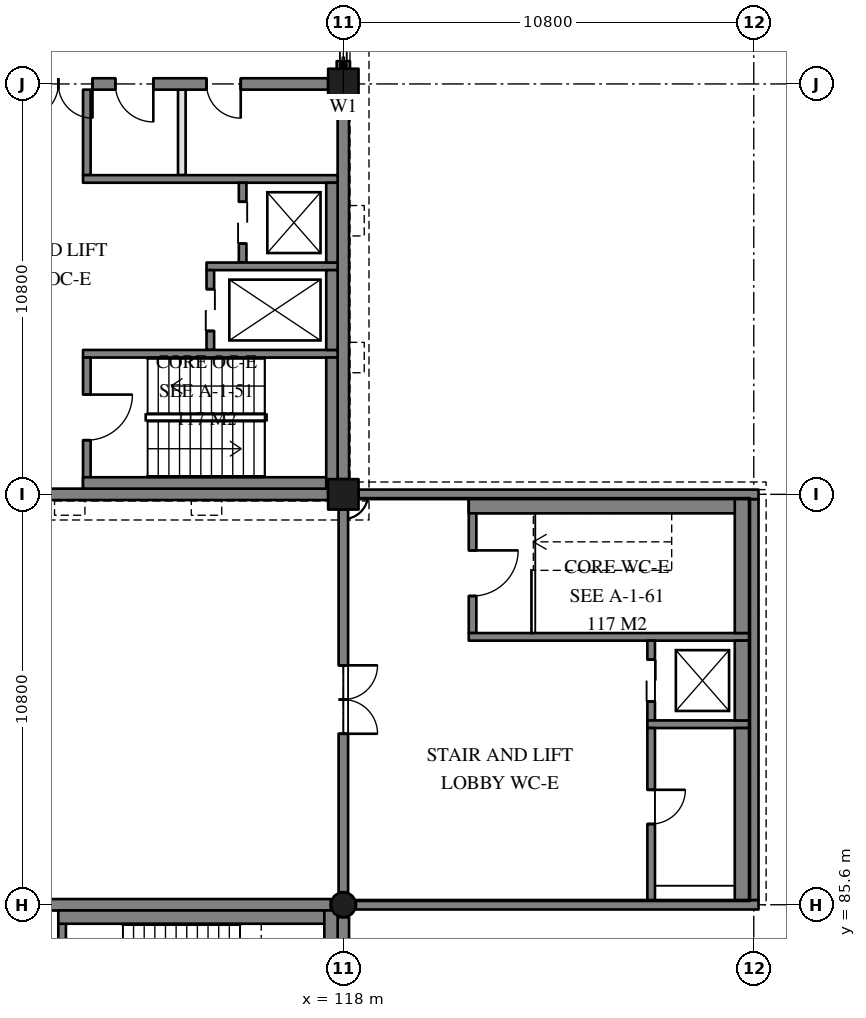
"""IFC4 building model, lengths in metres.
Left out: names, types, materials, properties, quantities, classifications, styles, units other than length and angle.
Written with IfcOpenShell. Run it as: python <this file> out.ifc"""

import sys

from ifc_helpers import new_model, si_unit, direction, frame, frame_2d, origin, origin_2d, place, context, subcontext, project, spatial, rectangle, hollow_circle, extrude, element, fill, save


model = new_model("IFC4")
c1 = context("Model", 3, precision=1e-05, world=origin(), true_north=direction((0.0, 1.0)))
c2 = subcontext(c1, "Body", "Model", "MODEL_VIEW")
j1 = project(units=[si_unit("LENGTHUNIT", "METRE"), si_unit("PLANEANGLEUNIT", "RADIAN")], contexts=[c1])
p1 = place(None, origin())
s1 = spatial("IfcSite", under=j1, at=p1, CompositionType="ELEMENT")
p2 = place(p1, origin())
s2 = spatial("IfcBuilding", under=s1, at=p2, CompositionType="ELEMENT")
p3 = place(p2, frame((0.0, 0.0, 4.8)))
s3 = spatial("IfcBuildingStorey", under=s2, at=p3, CompositionType="ELEMENT", Elevation=4.8)
p4 = place(p3, frame((118.0, 85.6, 0.0), z_axis=(0.0, 0.0, 1.0), x_axis=(1.0, 0.0, 0.0)))
e1 = element("IfcColumn", 1, at=p4, inside=s3, PredefinedType="COLUMN", context=c2, shape_type="SweptSolid", body=[
    extrude(hollow_circle(Radius=0.33, WallThickness=0.025, at=origin_2d()), origin(), (0.0, 0.0, 1.0), 3.9),
])
p5 = place(p3, frame((118.0, 96.4, 0.0), z_axis=(0.0, 0.0, 1.0), x_axis=(1.0, 0.0, 0.0)))
e2 = element("IfcColumn", 2, at=p5, inside=s3, PredefinedType="COLUMN", context=c2, shape_type="SweptSolid", body=[
    extrude(rectangle(XDim=0.8, YDim=0.8, at=origin_2d()), origin(), (0.0, 0.0, 1.0), 3.9),
])
p6 = place(p3, frame((118.0, 107.2, -1.3), z_axis=(0.0, 0.0, 1.0), x_axis=(1.0, 0.0, 0.0)))
e3 = element("IfcColumn", 3, at=p6, inside=s3, PredefinedType="COLUMN", context=c2, shape_type="SweptSolid", body=[
    extrude(rectangle(XDim=0.8, YDim=0.8, at=origin_2d()), origin(), (0.0, 0.0, 1.0), 5.2),
])
p7 = place(p3, frame((118.0, 75.13, 0.0), z_axis=(0.0, 0.0, 1.0), x_axis=(0.0, 1.0, 0.0)))
e4 = element("IfcWall", 4, at=p7, inside=s3, PredefinedType="SOLIDWALL", context=c2, shape_type="SweptSolid", body=[
    extrude(rectangle(XDim=10.14, YDim=0.3, at=frame_2d((5.07, 0.0))), origin(), (0.0, 0.0, 1.0), 3.9),
])
p8 = place(p3, frame((117.67, 85.6, 0.0), z_axis=(0.0, 0.0, 1.0), x_axis=(-1.0, 0.0, 0.0)))
e5 = element("IfcWall", 5, at=p8, inside=s3, PredefinedType="SOLIDWALL", context=c2, shape_type="SweptSolid", body=[
    extrude(rectangle(XDim=10.14, YDim=0.3, at=frame_2d((5.07, 0.0))), origin(), (0.0, 0.0, 1.0), 3.9),
])
p9 = place(p3, frame((118.33, 85.6, 0.0), z_axis=(0.0, 0.0, 1.0), x_axis=(1.0, 0.0, 0.0)))
e6 = element("IfcWall", 6, at=p9, inside=s3, PredefinedType="SOLIDWALL", context=c2, shape_type="SweptSolid", body=[
    extrude(rectangle(XDim=10.595, YDim=0.25, at=frame_2d((5.297, 0.0))), origin(), (0.0, 0.0, 1.0), 3.9),
])
p10 = place(p3, frame((128.8, 85.725, 0.0), z_axis=(0.0, 0.0, 1.0), x_axis=(0.0, 1.0, 0.0)))
e7 = element("IfcWall", 7, at=p10, inside=s3, PredefinedType="SOLIDWALL", context=c2, shape_type="SweptSolid", body=[
    extrude(rectangle(XDim=10.55, YDim=0.25, at=frame_2d((5.275, 0.0))), origin(), (0.0, 0.0, 1.0), 3.9),
])
p11 = place(p3, frame((128.925, 96.4, 0.0), z_axis=(0.0, 0.0, 1.0), x_axis=(-1.0, 0.0, 0.0)))
e8 = element("IfcWall", 8, at=p11, inside=s3, PredefinedType="SOLIDWALL", context=c2, shape_type="SweptSolid", body=[
    extrude(rectangle(XDim=10.525, YDim=0.25, at=frame_2d((5.263, 0.0))), origin(), (0.0, 0.0, 1.0), 3.9),
])
p12 = place(p3, frame((118.0, 96.0, 0.0), z_axis=(0.0, 0.0, 1.0), x_axis=(0.0, -1.0, 0.0)))
e9 = element("IfcWall", 9, at=p12, inside=s3, PredefinedType="SOLIDWALL", context=c2, shape_type="SweptSolid", body=[
    extrude(rectangle(XDim=10.07, YDim=0.25, at=frame_2d((5.035, 0.0))), origin(), (0.0, 0.0, 1.0), 3.9),
])
p13 = place(p12, frame((4.1, 0.0, 0.0)))
e10 = element("IfcOpeningElement", 10, at=p13, cuts=e9, PredefinedType="OPENING", context=c2, shape_type="SweptSolid", body=[
    extrude(rectangle(XDim=1.8, YDim=2.1, at=frame_2d((0.9, 1.05))), frame((0.0, 0.135, 0.0), z_axis=(0.0, -1.0, 0.0), x_axis=(1.0, 0.0, 0.0)), (0.0, 0.0, 1.0), 0.27),
])
for number, where, z_axis, x_axis in (
    (11, (107.6, 96.4, 0.0), (0.0, 0.0, 1.0), (1.0, 0.0, 0.0)),
    (12, (118.0, 96.8, 0.0), (0.0, 0.0, 1.0), (0.0, 1.0, 0.0)),
):
    element("IfcWall", number, at=place(p3, frame(where, z_axis=z_axis, x_axis=x_axis)), inside=s3, PredefinedType="SOLIDWALL", context=c2, shape_type="SweptSolid", body=[
        extrude(rectangle(XDim=10.0, YDim=0.3, at=frame_2d((5.0, 0.0))), origin(), (0.0, 0.0, 1.0), 3.9),
    ])
p14 = place(p3, frame((117.6, 107.2, 0.0), z_axis=(0.0, 0.0, 1.0), x_axis=(-1.0, 0.0, 0.0)))
e13 = element("IfcWall", 13, at=p14, inside=s3, PredefinedType="SOLIDWALL", context=c2, shape_type="SweptSolid", body=[
    extrude(rectangle(XDim=10.0, YDim=0.3, at=frame_2d((5.0, 0.0))), origin(), (0.0, 0.0, 1.0), 3.9),
])
p15 = place(p14, frame((6.2, 0.0, 0.0)))
e14 = element("IfcOpeningElement", 14, at=p15, cuts=e13, PredefinedType="OPENING", context=c2, shape_type="SweptSolid", body=[
    extrude(rectangle(XDim=1.8, YDim=2.1, at=frame_2d((0.9, 1.05))), frame((0.0, 0.16, 0.0), z_axis=(0.0, -1.0, 0.0), x_axis=(1.0, 0.0, 0.0)), (0.0, 0.0, 1.0), 0.32),
])
p16 = place(p14, frame((4.6, 0.0, 0.0)))
e15 = element("IfcOpeningElement", 15, at=p16, cuts=e13, PredefinedType="OPENING", context=c2, shape_type="SweptSolid", body=[
    extrude(rectangle(XDim=1.0, YDim=2.1, at=frame_2d((0.5, 1.05))), frame((0.0, 0.16, 0.0), z_axis=(0.0, -1.0, 0.0), x_axis=(1.0, 0.0, 0.0)), (0.0, 0.0, 1.0), 0.32),
])
p17 = place(p14, frame((2.3, 0.0, 0.0)))
e16 = element("IfcOpeningElement", 16, at=p17, cuts=e13, PredefinedType="OPENING", context=c2, shape_type="SweptSolid", body=[
    extrude(rectangle(XDim=0.9, YDim=2.1, at=frame_2d((0.45, 1.05))), frame((0.0, 0.16, 0.0), z_axis=(0.0, -1.0, 0.0), x_axis=(1.0, 0.0, 0.0)), (0.0, 0.0, 1.0), 0.32),
])
p18 = place(p3, frame((118.0, 107.6, 0.0), z_axis=(0.0, 0.0, 1.0), x_axis=(0.0, 1.0, 0.0)))
e17 = element("IfcWall", 17, at=p18, inside=s3, PredefinedType="SOLIDWALL", context=c2, shape_type="SweptSolid", body=[
    extrude(rectangle(XDim=0.2, YDim=0.35, at=frame_2d((0.1, 0.0))), origin(), (0.0, 0.0, 1.0), 3.6),
])
p19 = place(p3, frame((110.6, 85.45, 0.0), z_axis=(0.0, 0.0, 1.0), x_axis=(0.0, -1.0, 0.0)))
e18 = element("IfcWall", 18, at=p19, inside=s3, PredefinedType="SOLIDWALL", context=c2, shape_type="SweptSolid", body=[
    extrude(rectangle(XDim=3.5, YDim=0.2, at=frame_2d((1.75, 0.0))), origin(), (0.0, 0.0, 1.0), 3.6),
])
p20 = place(p19, frame((1.325, 0.0, 0.0)))
e19 = element("IfcOpeningElement", 19, at=p20, cuts=e18, PredefinedType="OPENING", context=c2, shape_type="SweptSolid", body=[
    extrude(rectangle(XDim=1.2, YDim=2.1, at=frame_2d((0.6, 1.05))), frame((0.0, 0.11, 0.0), z_axis=(0.0, -1.0, 0.0), x_axis=(1.0, 0.0, 0.0)), (0.0, 0.0, 1.0), 0.22),
])
p21 = place(p3, frame((110.5, 85.275, -0.4), z_axis=(0.0, 0.0, 1.0), x_axis=(1.0, 0.0, 0.0)))
e20 = element("IfcWall", 20, at=p21, inside=s3, PredefinedType="SOLIDWALL", context=c2, shape_type="SweptSolid", body=[
    extrude(rectangle(XDim=7.35, YDim=0.35, at=frame_2d((3.675, 0.0))), origin(), (0.0, 0.0, 1.0), 4.0),
])
p22 = place(p3, frame((117.675, 85.45, -0.4), z_axis=(0.0, 0.0, 1.0), x_axis=(0.0, -1.0, 0.0)))
e21 = element("IfcWall", 21, at=p22, inside=s3, PredefinedType="SOLIDWALL", context=c2, shape_type="SweptSolid", body=[
    extrude(rectangle(XDim=3.5, YDim=0.35, at=frame_2d((1.75, 0.0))), origin(), (0.0, 0.0, 1.0), 4.0),
])
p23 = place(p3, frame((121.4, 96.275, 0.0), z_axis=(0.0, 0.0, 1.0), x_axis=(0.0, -1.0, 0.0)))
e22 = element("IfcWall", 22, at=p23, inside=s3, PredefinedType="SOLIDWALL", context=c2, shape_type="SweptSolid", body=[
    extrude(rectangle(XDim=3.525, YDim=0.2, at=frame_2d((1.762, 0.0))), origin(), (0.0, 0.0, 1.0), 3.6),
])
p24 = place(p23, frame((1.35, 0.0, 0.0)))
e23 = element("IfcOpeningElement", 23, at=p24, cuts=e22, PredefinedType="OPENING", context=c2, shape_type="SweptSolid", body=[
    extrude(rectangle(XDim=1.2, YDim=2.1, at=frame_2d((0.6, 1.05))), frame((0.0, 0.11, 0.0), z_axis=(0.0, -1.0, 0.0), x_axis=(1.0, 0.0, 0.0)), (0.0, 0.0, 1.0), 0.22),
])
p25 = place(p3, frame((121.3, 92.65, 0.0), z_axis=(0.0, 0.0, 1.0), x_axis=(1.0, 0.0, 0.0)))
e24 = element("IfcWall", 24, at=p25, inside=s3, PredefinedType="SOLIDWALL", context=c2, shape_type="SweptSolid", body=[
    extrude(rectangle(XDim=7.375, YDim=0.2, at=frame_2d((3.688, 0.0))), origin(), (0.0, 0.0, 1.0), 3.6),
])
p26 = place(p3, frame((126.1, 92.55, 0.0), z_axis=(0.0, 0.0, 1.0), x_axis=(0.0, -1.0, 0.0)))
e25 = element("IfcWall", 25, at=p26, inside=s3, PredefinedType="SOLIDWALL", context=c2, shape_type="SweptSolid", body=[
    extrude(rectangle(XDim=2.1, YDim=0.2, at=frame_2d((1.05, 0.0))), origin(), (0.0, 0.0, 1.0), 3.6),
])
p27 = place(p26, frame((0.5, 0.0, 0.0)))
e26 = element("IfcOpeningElement", 26, at=p27, cuts=e25, PredefinedType="OPENING", context=c2, shape_type="SweptSolid", body=[
    extrude(rectangle(XDim=1.1, YDim=2.1, at=frame_2d((0.55, 1.05))), frame((0.0, 0.11, 0.0), z_axis=(0.0, -1.0, 0.0), x_axis=(1.0, 0.0, 0.0)), (0.0, 0.0, 1.0), 0.22),
])
p28 = place(p3, frame((126.0, 90.35, 0.0), z_axis=(0.0, 0.0, 1.0), x_axis=(1.0, 0.0, 0.0)))
e27 = element("IfcWall", 27, at=p28, inside=s3, PredefinedType="SOLIDWALL", context=c2, shape_type="SweptSolid", body=[
    extrude(rectangle(XDim=2.675, YDim=0.2, at=frame_2d((1.337, 0.0))), origin(), (0.0, 0.0, 1.0), 3.6),
])
p29 = place(p3, frame((126.1, 90.25, 0.0), z_axis=(0.0, 0.0, 1.0), x_axis=(0.0, -1.0, 0.0)))
e28 = element("IfcWall", 28, at=p29, inside=s3, PredefinedType="SOLIDWALL", context=c2, shape_type="SweptSolid", body=[
    extrude(rectangle(XDim=4.525, YDim=0.2, at=frame_2d((2.262, 0.0))), origin(), (0.0, 0.0, 1.0), 3.6),
])
p30 = place(p29, frame((1.625, 0.0, 0.0)))
e29 = element("IfcOpeningElement", 29, at=p30, cuts=e28, PredefinedType="OPENING", context=c2, shape_type="SweptSolid", body=[
    extrude(rectangle(XDim=0.9, YDim=2.1, at=frame_2d((0.45, 1.05))), frame((0.0, 0.11, 0.0), z_axis=(0.0, -1.0, 0.0), x_axis=(1.0, 0.0, 0.0)), (0.0, 0.0, 1.0), 0.22),
])
p31 = place(p3, frame((121.3, 96.087, -0.4), z_axis=(0.0, 0.0, 1.0), x_axis=(1.0, 0.0, 0.0)))
e30 = element("IfcWall", 30, at=p31, inside=s3, PredefinedType="SOLIDWALL", context=c2, shape_type="SweptSolid", body=[
    extrude(rectangle(XDim=7.375, YDim=0.375, at=frame_2d((3.688, 0.0))), origin(), (0.0, 0.0, 1.0), 4.0),
])
p32 = place(p3, frame((128.488, 96.275, -0.4), z_axis=(0.0, 0.0, 1.0), x_axis=(0.0, -1.0, 0.0)))
e31 = element("IfcWall", 31, at=p32, inside=s3, PredefinedType="SOLIDWALL", context=c2, shape_type="SweptSolid", body=[
    extrude(rectangle(XDim=3.525, YDim=0.375, at=frame_2d((1.762, 0.0))), origin(), (0.0, 0.0, 1.0), 4.0),
])
p33 = place(p3, frame((128.488, 92.55, -0.4), z_axis=(0.0, 0.0, 1.0), x_axis=(0.0, -1.0, 0.0)))
e32 = element("IfcWall", 32, at=p33, inside=s3, PredefinedType="SOLIDWALL", context=c2, shape_type="SweptSolid", body=[
    extrude(rectangle(XDim=2.1, YDim=0.375, at=frame_2d((1.05, 0.0))), origin(), (0.0, 0.0, 1.0), 4.0),
])
p34 = place(p3, frame((128.488, 90.25, -0.4), z_axis=(0.0, 0.0, 1.0), x_axis=(0.0, -1.0, 0.0)))
e33 = element("IfcWall", 33, at=p34, inside=s3, PredefinedType="SOLIDWALL", context=c2, shape_type="SweptSolid", body=[
    extrude(rectangle(XDim=4.525, YDim=0.375, at=frame_2d((2.262, 0.0))), origin(), (0.0, 0.0, 1.0), 4.0),
])
p35 = place(p3, frame((111.25, 107.05, 0.0), z_axis=(0.0, 0.0, 1.0), x_axis=(0.0, -1.0, 0.0)))
e34 = element("IfcWall", 34, at=p35, inside=s3, PredefinedType="SOLIDWALL", context=c2, shape_type="SweptSolid", body=[
    extrude(rectangle(XDim=2.25, YDim=0.2, at=frame_2d((1.125, 0.0))), origin(), (0.0, 0.0, 1.0), 3.6),
])
p36 = place(p3, frame((111.15, 104.7, 0.0), z_axis=(0.0, 0.0, 1.0), x_axis=(1.0, 0.0, 0.0)))
e35 = element("IfcWall", 35, at=p36, inside=s3, PredefinedType="SOLIDWALL", context=c2, shape_type="SweptSolid", body=[
    extrude(rectangle(XDim=6.7, YDim=0.2, at=frame_2d((3.35, 0.0))), origin(), (0.0, 0.0, 1.0), 3.6),
])
p37 = place(p3, frame((115.35, 104.6, 0.0), z_axis=(0.0, 0.0, 1.0), x_axis=(0.0, -1.0, 0.0)))
e36 = element("IfcWall", 36, at=p37, inside=s3, PredefinedType="SOLIDWALL", context=c2, shape_type="SweptSolid", body=[
    extrude(rectangle(XDim=2.1, YDim=0.2, at=frame_2d((1.05, 0.0))), origin(), (0.0, 0.0, 1.0), 3.6),
])
p38 = place(p37, frame((0.5, 0.0, 0.0)))
e37 = element("IfcOpeningElement", 37, at=p38, cuts=e36, PredefinedType="OPENING", context=c2, shape_type="SweptSolid", body=[
    extrude(rectangle(XDim=1.1, YDim=2.1, at=frame_2d((0.55, 1.05))), frame((0.0, 0.11, 0.0), z_axis=(0.0, -1.0, 0.0), x_axis=(1.0, 0.0, 0.0)), (0.0, 0.0, 1.0), 0.22),
])
p39 = place(p3, frame((114.4, 102.4, 0.0), z_axis=(0.0, 0.0, 1.0), x_axis=(1.0, 0.0, 0.0)))
e38 = element("IfcWall", 38, at=p39, inside=s3, PredefinedType="SOLIDWALL", context=c2, shape_type="SweptSolid", body=[
    extrude(rectangle(XDim=3.45, YDim=0.2, at=frame_2d((1.725, 0.0))), origin(), (0.0, 0.0, 1.0), 3.6),
])
p40 = place(p3, frame((114.5, 102.3, 0.0), z_axis=(0.0, 0.0, 1.0), x_axis=(0.0, -1.0, 0.0)))
e39 = element("IfcWall", 39, at=p40, inside=s3, PredefinedType="SOLIDWALL", context=c2, shape_type="SweptSolid", body=[
    extrude(rectangle(XDim=2.1, YDim=0.2, at=frame_2d((1.05, 0.0))), origin(), (0.0, 0.0, 1.0), 3.6),
])
p41 = place(p40, frame((0.5, 0.0, 0.0)))
e40 = element("IfcOpeningElement", 40, at=p41, cuts=e39, PredefinedType="OPENING", context=c2, shape_type="SweptSolid", body=[
    extrude(rectangle(XDim=1.1, YDim=2.1, at=frame_2d((0.55, 1.05))), frame((0.0, 0.11, 0.0), z_axis=(0.0, -1.0, 0.0), x_axis=(1.0, 0.0, 0.0)), (0.0, 0.0, 1.0), 0.22),
])
p42 = place(p3, frame((111.15, 100.1, 0.0), z_axis=(0.0, 0.0, 1.0), x_axis=(1.0, 0.0, 0.0)))
e41 = element("IfcWall", 41, at=p42, inside=s3, PredefinedType="SOLIDWALL", context=c2, shape_type="SweptSolid", body=[
    extrude(rectangle(XDim=6.7, YDim=0.2, at=frame_2d((3.35, 0.0))), origin(), (0.0, 0.0, 1.0), 3.6),
])
p43 = place(p3, frame((111.25, 100.0, 0.0), z_axis=(0.0, 0.0, 1.0), x_axis=(0.0, -1.0, 0.0)))
e42 = element("IfcWall", 42, at=p43, inside=s3, PredefinedType="SOLIDWALL", context=c2, shape_type="SweptSolid", body=[
    extrude(rectangle(XDim=3.45, YDim=0.2, at=frame_2d((1.725, 0.0))), origin(), (0.0, 0.0, 1.0), 3.6),
])
p44 = place(p43, frame((0.975, 0.0, 0.0)))
e43 = element("IfcOpeningElement", 43, at=p44, cuts=e42, PredefinedType="OPENING", context=c2, shape_type="SweptSolid", body=[
    extrude(rectangle(XDim=1.2, YDim=2.1, at=frame_2d((0.6, 1.05))), frame((0.0, 0.11, 0.0), z_axis=(0.0, -1.0, 0.0), x_axis=(1.0, 0.0, 0.0)), (0.0, 0.0, 1.0), 0.22),
])
p45 = place(p3, frame((111.15, 96.7, 0.0), z_axis=(0.0, 0.0, 1.0), x_axis=(1.0, 0.0, 0.0)))
e44 = element("IfcWall", 44, at=p45, inside=s3, PredefinedType="SOLIDWALL", context=c2, shape_type="SweptSolid", body=[
    extrude(rectangle(XDim=6.7, YDim=0.3, at=frame_2d((3.35, 0.0))), origin(), (0.0, 0.0, 1.0), 3.6),
])
p46 = place(p3, frame((117.7, 100.0, 0.0), z_axis=(0.0, 0.0, 1.0), x_axis=(0.0, -1.0, 0.0)))
e45 = element("IfcWall", 45, at=p46, inside=s3, PredefinedType="SOLIDWALL", context=c2, shape_type="SweptSolid", body=[
    extrude(rectangle(XDim=3.45, YDim=0.3, at=frame_2d((1.725, 0.0))), origin(), (0.0, 0.0, 1.0), 3.6),
])
for number, where, z_axis, x_axis in (
    (46, (117.7, 104.6, 0.0), (0.0, 0.0, 1.0), (0.0, -1.0, 0.0)),
    (47, (117.7, 102.3, 0.0), (0.0, 0.0, 1.0), (0.0, -1.0, 0.0)),
):
    element("IfcWall", number, at=place(p3, frame(where, z_axis=z_axis, x_axis=x_axis)), inside=s3, PredefinedType="SOLIDWALL", context=c2, shape_type="SweptSolid", body=[
        extrude(rectangle(XDim=2.1, YDim=0.3, at=frame_2d((1.05, 0.0))), origin(), (0.0, 0.0, 1.0), 3.6),
    ])
p47 = place(p3, frame((113.75, 107.05, 0.0), z_axis=(0.0, 0.0, 1.0), x_axis=(0.0, -1.0, 0.0)))
e48 = element("IfcWall", 48, at=p47, inside=s3, PredefinedType="PARTITIONING", context=c2, shape_type="SweptSolid", body=[
    extrude(rectangle(XDim=2.25, YDim=0.2, at=frame_2d((1.125, 0.0))), origin(), (0.0, 0.0, 1.0), 3.6),
])
p48 = place(p27, frame((1.1, 0.0, 0.0), z_axis=(0.0, 0.0, 1.0), x_axis=(-1.0, 0.0, 0.0)))
e49 = element("IfcDoor", 49, at=p48, inside=s3, OperationType="DOUBLE_DOOR_SLIDING", PredefinedType="DOOR", context=c2, shape_type="SweptSolid", body=[
    extrude(rectangle(XDim=1.1, YDim=2.1, at=frame_2d((0.55, 1.05))), frame((0.0, 0.025, 0.0), z_axis=(0.0, -1.0, 0.0), x_axis=(1.0, 0.0, 0.0)), (0.0, 0.0, 1.0), 0.05),
])
fill(e26, e49)
p49 = place(p24, frame((1.2, 0.0, 0.0), z_axis=(0.0, 0.0, 1.0), x_axis=(-1.0, 0.0, 0.0)))
e50 = element("IfcDoor", 50, at=p49, inside=s3, OperationType="SINGLE_SWING_LEFT", PredefinedType="DOOR", context=c2, shape_type="SweptSolid", body=[
    extrude(rectangle(XDim=1.2, YDim=2.1, at=frame_2d((0.6, 1.05))), frame((0.0, 0.025, 0.0), z_axis=(0.0, -1.0, 0.0), x_axis=(1.0, 0.0, 0.0)), (0.0, 0.0, 1.0), 0.05),
])
fill(e23, e50)
p50 = place(p30, frame((0.9, 0.0, 0.0), z_axis=(0.0, 0.0, 1.0), x_axis=(-1.0, 0.0, 0.0)))
e51 = element("IfcDoor", 51, at=p50, inside=s3, OperationType="SINGLE_SWING_RIGHT", PredefinedType="DOOR", context=c2, shape_type="SweptSolid", body=[
    extrude(rectangle(XDim=0.9, YDim=2.1, at=frame_2d((0.45, 1.05))), frame((0.0, 0.025, 0.0), z_axis=(0.0, -1.0, 0.0), x_axis=(1.0, 0.0, 0.0)), (0.0, 0.0, 1.0), 0.05),
])
fill(e29, e51)
p51 = place(p13, frame((1.8, 0.0, 0.0), z_axis=(0.0, 0.0, 1.0), x_axis=(-1.0, 0.0, 0.0)))
e52 = element("IfcDoor", 52, at=p51, inside=s3, OperationType="DOUBLE_DOOR_DOUBLE_SWING", PredefinedType="DOOR", context=c2, shape_type="SweptSolid", body=[
    extrude(rectangle(XDim=1.8, YDim=2.1, at=frame_2d((0.9, 1.05))), frame((0.0, 0.025, 0.0), z_axis=(0.0, -1.0, 0.0), x_axis=(1.0, 0.0, 0.0)), (0.0, 0.0, 1.0), 0.05),
])
fill(e10, e52)
p52 = place(p38, frame((1.1, 0.0, 0.0), z_axis=(0.0, 0.0, 1.0), x_axis=(-1.0, 0.0, 0.0)))
e53 = element("IfcDoor", 53, at=p52, inside=s3, OperationType="DOUBLE_DOOR_SLIDING", PredefinedType="DOOR", context=c2, shape_type="SweptSolid", body=[
    extrude(rectangle(XDim=1.1, YDim=2.1, at=frame_2d((0.55, 1.05))), frame((0.0, 0.025, 0.0), z_axis=(0.0, -1.0, 0.0), x_axis=(1.0, 0.0, 0.0)), (0.0, 0.0, 1.0), 0.05),
])
fill(e37, e53)
p53 = place(p41, frame((1.1, 0.0, 0.0), z_axis=(0.0, 0.0, 1.0), x_axis=(-1.0, 0.0, 0.0)))
e54 = element("IfcDoor", 54, at=p53, inside=s3, OperationType="DOUBLE_DOOR_SLIDING", PredefinedType="DOOR", context=c2, shape_type="SweptSolid", body=[
    extrude(rectangle(XDim=1.1, YDim=2.1, at=frame_2d((0.55, 1.05))), frame((0.0, 0.025, 0.0), z_axis=(0.0, -1.0, 0.0), x_axis=(1.0, 0.0, 0.0)), (0.0, 0.0, 1.0), 0.05),
])
fill(e40, e54)
p54 = place(p44, frame((1.2, 0.0, 0.0), z_axis=(0.0, 0.0, 1.0), x_axis=(-1.0, 0.0, 0.0)))
e55 = element("IfcDoor", 55, at=p54, inside=s3, OperationType="SINGLE_SWING_RIGHT", PredefinedType="DOOR", context=c2, shape_type="SweptSolid", body=[
    extrude(rectangle(XDim=1.2, YDim=2.1, at=frame_2d((0.6, 1.05))), frame((0.0, 0.025, 0.0), z_axis=(0.0, -1.0, 0.0), x_axis=(1.0, 0.0, 0.0)), (0.0, 0.0, 1.0), 0.05),
])
fill(e43, e55)
p55 = place(p15, frame((1.8, 0.0, 0.0), z_axis=(0.0, 0.0, 1.0), x_axis=(-1.0, 0.0, 0.0)))
e56 = element("IfcDoor", 56, at=p55, inside=s3, OperationType="DOUBLE_DOOR_DOUBLE_SWING", PredefinedType="DOOR", context=c2, shape_type="SweptSolid", body=[
    extrude(rectangle(XDim=1.8, YDim=2.1, at=frame_2d((0.9, 1.05))), frame((0.0, 0.025, 0.0), z_axis=(0.0, -1.0, 0.0), x_axis=(1.0, 0.0, 0.0)), (0.0, 0.0, 1.0), 0.05),
])
fill(e14, e56)
p56 = place(p16, origin())
e57 = element("IfcDoor", 57, at=p56, inside=s3, OperationType="SINGLE_SWING_RIGHT", PredefinedType="DOOR", context=c2, shape_type="SweptSolid", body=[
    extrude(rectangle(XDim=1.0, YDim=2.1, at=frame_2d((0.5, 1.05))), frame((0.0, 0.025, 0.0), z_axis=(0.0, -1.0, 0.0), x_axis=(1.0, 0.0, 0.0)), (0.0, 0.0, 1.0), 0.05),
])
fill(e15, e57)
p57 = place(p17, origin())
e58 = element("IfcDoor", 58, at=p57, inside=s3, OperationType="SINGLE_SWING_LEFT", PredefinedType="DOOR", context=c2, shape_type="SweptSolid", body=[
    extrude(rectangle(XDim=0.9, YDim=2.1, at=frame_2d((0.45, 1.05))), frame((0.0, 0.025, 0.0), z_axis=(0.0, -1.0, 0.0), x_axis=(1.0, 0.0, 0.0)), (0.0, 0.0, 1.0), 0.05),
])
fill(e16, e58)
save(model, sys.argv[1])
